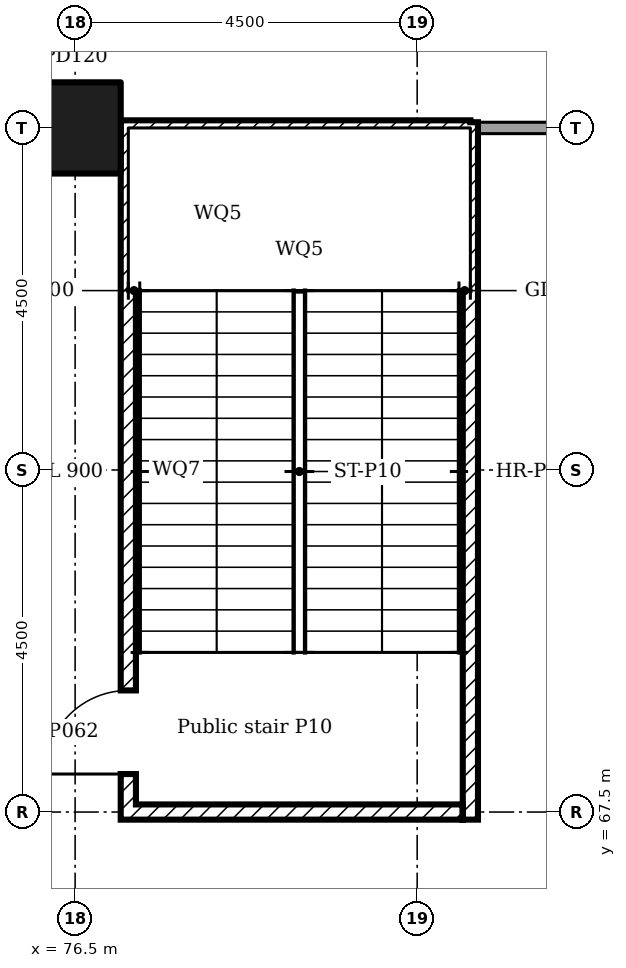
"""IFC4 building model, lengths in metres.
Left out: names, types, materials, properties, quantities, classifications, styles, units other than length and angle.
Written with IfcOpenShell. Run it as: python <this file> out.ifc"""

import sys

from ifc_helpers import new_model, si_unit, direction, frame, frame_2d, origin, origin_2d, place, context, subcontext, project, spatial, rectangle, extrude, element, fill, save


model = new_model("IFC4")
c1 = context("Model", 3, precision=1e-05, world=origin(), true_north=direction((0.0, 1.0)))
c2 = subcontext(c1, "Body", "Model", "MODEL_VIEW")
j1 = project(units=[si_unit("LENGTHUNIT", "METRE"), si_unit("PLANEANGLEUNIT", "RADIAN")], contexts=[c1])
p1 = place(None, origin())
s1 = spatial("IfcSite", under=j1, at=p1, CompositionType="ELEMENT")
p2 = place(p1, origin())
s2 = spatial("IfcBuilding", under=s1, at=p2, CompositionType="ELEMENT")
p3 = place(p2, origin())
s3 = spatial("IfcBuildingStorey", under=s2, at=p3, CompositionType="ELEMENT", Elevation=0.0)
p4 = place(p3, frame((76.5, 76.5, 0.0)))
e1 = element("IfcColumn", 1, at=p4, inside=s3, PredefinedType="COLUMN", context=c2, shape_type="SweptSolid", body=[
    extrude(rectangle(XDim=1.2, YDim=1.2, at=origin_2d()), origin(), (0.0, 0.0, 1.0), 6.0),
])
p5 = place(p3, frame((81.8, 76.5, 0.0)))
e2 = element("IfcWall", 2, at=p5, inside=s3, PredefinedType="PARTITIONING", context=c2, shape_type="SweptSolid", body=[
    extrude(rectangle(XDim=7.605, YDim=0.15, at=frame_2d((3.802, 0.0))), origin(), (0.0, 0.0, 1.0), 5.55),
])
p6 = place(p5, frame((2.85, 0.0, 0.0)))
e3 = element("IfcOpeningElement", 3, at=p6, cuts=e2, PredefinedType="OPENING", context=c2, shape_type="SweptSolid", body=[
    extrude(rectangle(XDim=1.8, YDim=2.1, at=frame_2d((0.9, 1.05))), frame((0.0, 0.085, 0.0), z_axis=(0.0, -1.0, 0.0), x_axis=(1.0, 0.0, 0.0)), (0.0, 0.0, 1.0), 0.17),
])
p7 = place(p3, frame((77.2, 67.4, 0.0), z_axis=(0.0, 0.0, 1.0), x_axis=(0.0, 1.0, 0.0)))
e4 = element("IfcWall", 4, at=p7, inside=s3, PredefinedType="SOLIDWALL", context=c2, shape_type="SweptSolid", body=[
    extrude(rectangle(XDim=9.2, YDim=0.2, at=frame_2d((4.6, 0.0))), origin(), (0.0, 0.0, 1.0), 5.55),
])
p8 = place(p7, frame((0.6, 0.0, 0.0)))
e5 = element("IfcOpeningElement", 5, at=p8, cuts=e4, PredefinedType="OPENING", context=c2, shape_type="SweptSolid", body=[
    extrude(rectangle(XDim=1.1, YDim=2.1, at=frame_2d((0.55, 1.05))), frame((0.0, 0.11, 0.0), z_axis=(0.0, -1.0, 0.0), x_axis=(1.0, 0.0, 0.0)), (0.0, 0.0, 1.0), 0.22),
])
p9 = place(p3, frame((81.7, 67.4, 0.0), z_axis=(0.0, 0.0, 1.0), x_axis=(0.0, 1.0, 0.0)))
e6 = element("IfcWall", 6, at=p9, inside=s3, PredefinedType="SOLIDWALL", context=c2, shape_type="SweptSolid", body=[
    extrude(rectangle(XDim=9.175, YDim=0.2, at=frame_2d((4.587, 0.0))), origin(), (0.0, 0.0, 1.0), 5.55),
])
p10 = place(p3, frame((77.3, 67.5, 0.0)))
e7 = element("IfcWall", 7, at=p10, inside=s3, PredefinedType="SOLIDWALL", context=c2, shape_type="SweptSolid", body=[
    extrude(rectangle(XDim=4.3, YDim=0.2, at=frame_2d((2.15, 0.0))), origin(), (0.0, 0.0, 1.0), 5.55),
])
p11 = place(p3, frame((77.3, 76.5, 0.0)))
e8 = element("IfcWall", 8, at=p11, inside=s3, PredefinedType="SOLIDWALL", context=c2, shape_type="SweptSolid", body=[
    extrude(rectangle(XDim=4.4, YDim=0.2, at=frame_2d((2.2, 0.0))), origin(), (0.0, 0.0, 1.0), 5.55),
])
for number, where in (
    (9, (77.3, 74.46, 0.0)),
    (10, (77.3, 75.8, 0.0)),
):
    element("IfcWall", number, at=place(p3, frame(where)), inside=s3, PredefinedType="SOLIDWALL", context=c2, shape_type="SweptSolid", body=[
        extrude(rectangle(XDim=4.3, YDim=0.2, at=frame_2d((2.15, 0.0))), origin(), (0.0, 0.0, 1.0), 2.8),
    ])
p12 = place(p8, origin())
e11 = element("IfcDoor", 11, at=p12, inside=s3, OperationType="SINGLE_SWING_RIGHT", PredefinedType="DOOR", context=c2, shape_type="SweptSolid", body=[
    extrude(rectangle(XDim=1.1, YDim=2.1, at=frame_2d((0.55, 1.05))), frame((0.0, 0.025, 0.0), z_axis=(0.0, -1.0, 0.0), x_axis=(1.0, 0.0, 0.0)), (0.0, 0.0, 1.0), 0.05),
])
fill(e5, e11)
save(model, sys.argv[1])
